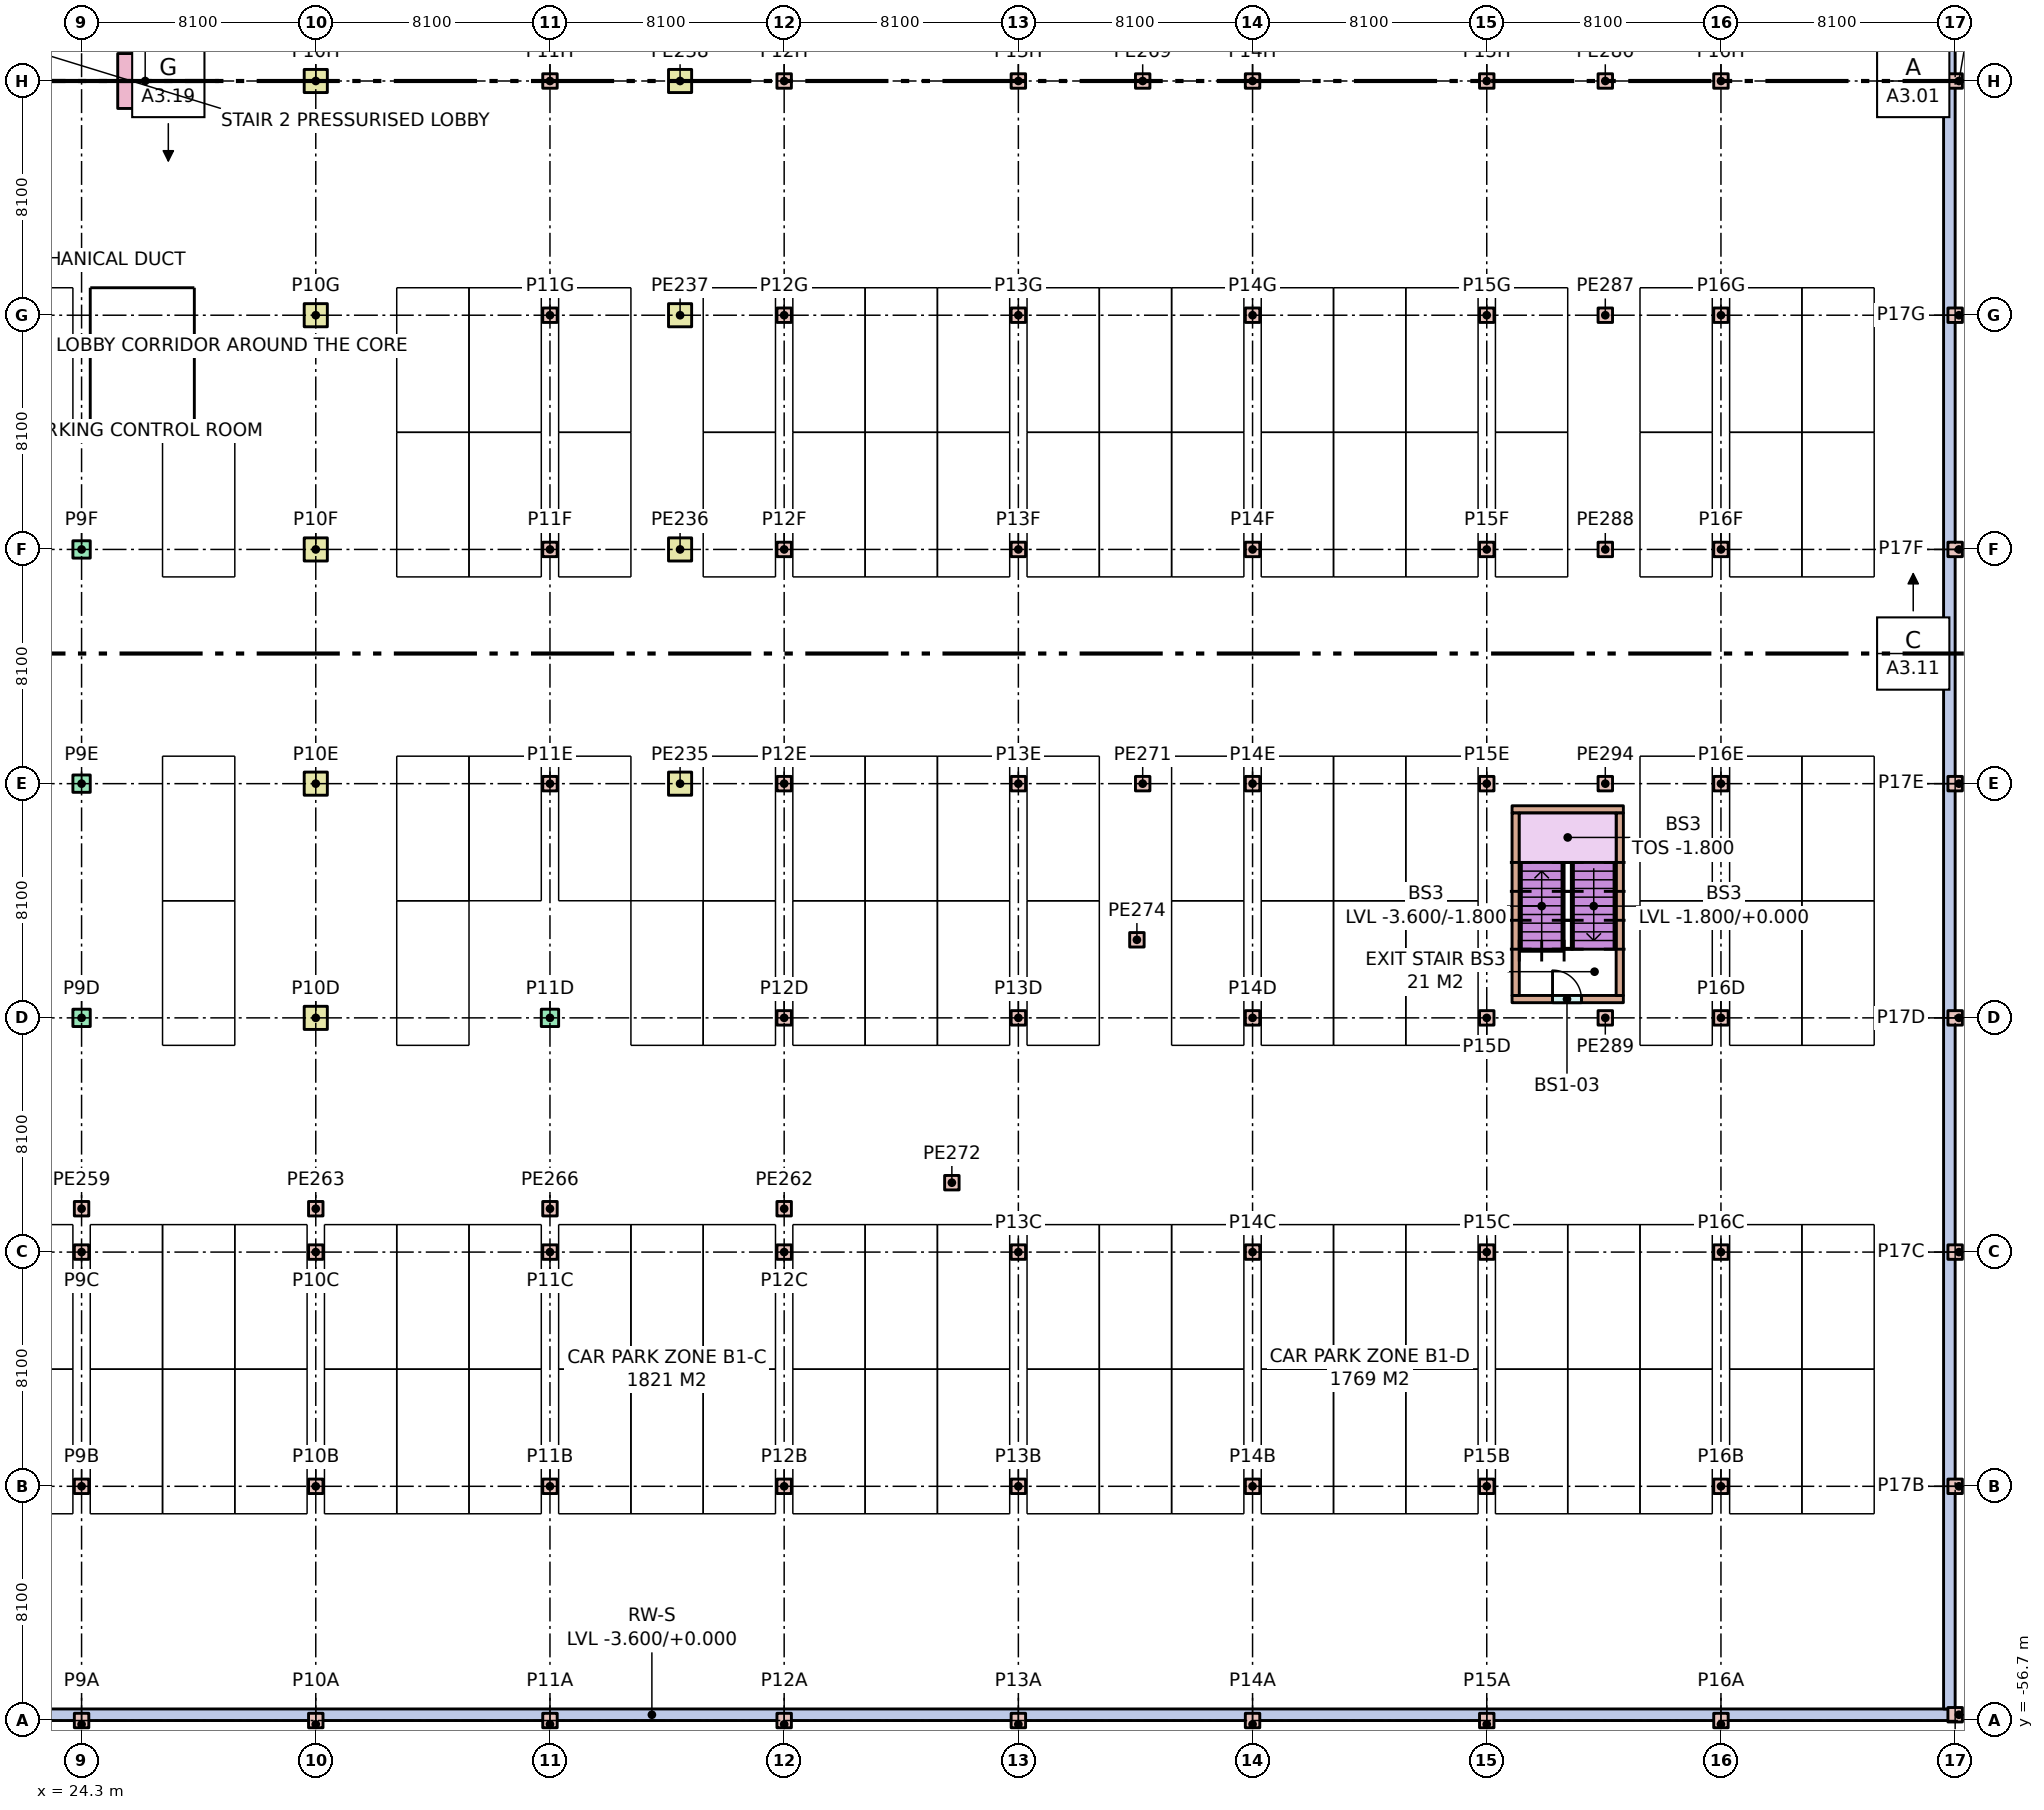
"""IFC4 building model, lengths in metres.
Left out: names, types, materials, properties, quantities, classifications, styles, units other than length and angle.
Written with IfcOpenShell. Run it as: python <this file> out.ifc"""

import sys

from ifc_helpers import new_model, si_unit, direction, frame, frame_2d, origin, origin_2d, place, context, subcontext, project, spatial, rectangle, extrude, element, fill, save


model = new_model("IFC4")
c1 = context("Model", 3, precision=1e-05, world=origin(), true_north=direction((0.0, 1.0)))
c2 = subcontext(c1, "Body", "Model", "MODEL_VIEW")
j1 = project(units=[si_unit("LENGTHUNIT", "METRE"), si_unit("PLANEANGLEUNIT", "RADIAN")], contexts=[c1])
p1 = place(None, origin())
s1 = spatial("IfcSite", under=j1, at=p1, CompositionType="ELEMENT")
p2 = place(p1, origin())
s2 = spatial("IfcBuilding", under=s1, at=p2, CompositionType="ELEMENT")
p3 = place(p2, frame((0.0, 0.0, -3.6)))
s3 = spatial("IfcBuildingStorey", under=s2, at=p3, CompositionType="ELEMENT", Elevation=-3.6)
p4 = place(p3, frame((-1.05, -56.5, 0.0), z_axis=(0.0, 0.0, 1.0), x_axis=(1.0, 0.0, 0.0)))
e1 = element("IfcWall", 1, at=p4, inside=s3, PredefinedType="SOLIDWALL", context=c2, shape_type="SweptSolid", body=[
    extrude(rectangle(XDim=90.15, YDim=0.4, at=frame_2d((45.075, 0.0))), origin(), (0.0, 0.0, 1.0), 3.6),
])
p5 = place(p3, frame((88.9, -56.3, 0.0), z_axis=(0.0, 0.0, 1.0), x_axis=(0.0, 1.0, 0.0)))
e2 = element("IfcWall", 2, at=p5, inside=s3, PredefinedType="SOLIDWALL", context=c2, shape_type="SweptSolid", body=[
    extrude(rectangle(XDim=112.6, YDim=0.4, at=frame_2d((56.3, 0.0))), origin(), (0.0, 0.0, 1.0), 3.6),
])
for number, where, z_axis, x_axis in (
    (3, (24.3, -56.7, 0.0), (0.0, 0.0, 1.0), (1.0, 0.0, 0.0)),
    (4, (24.3, -48.6, 0.0), (0.0, 0.0, 1.0), (1.0, 0.0, 0.0)),
    (5, (24.3, -40.5, 0.0), (0.0, 0.0, 1.0), (1.0, 0.0, 0.0)),
):
    element("IfcColumn", number, at=place(p3, frame(where, z_axis=z_axis, x_axis=x_axis)), inside=s3, PredefinedType="COLUMN", context=c2, shape_type="SweptSolid", body=[
        extrude(rectangle(XDim=0.5, YDim=0.5, at=origin_2d()), origin(), (0.0, 0.0, 1.0), 3.6),
    ])
for number, where, z_axis, x_axis in (
    (6, (24.3, -32.4, 0.0), (0.0, 0.0, 1.0), (1.0, 0.0, 0.0)),
    (7, (24.3, -24.3, 0.0), (0.0, 0.0, 1.0), (1.0, 0.0, 0.0)),
    (8, (24.3, -16.2, 0.0), (0.0, 0.0, 1.0), (1.0, 0.0, 0.0)),
):
    element("IfcColumn", number, at=place(p3, frame(where, z_axis=z_axis, x_axis=x_axis)), inside=s3, PredefinedType="COLUMN", context=c2, shape_type="SweptSolid", body=[
        extrude(rectangle(XDim=0.6, YDim=0.6, at=origin_2d()), origin(), (0.0, 0.0, 1.0), 3.6),
    ])
for number, where, z_axis, x_axis in (
    (9, (32.4, -56.7, 0.0), (0.0, 0.0, 1.0), (1.0, 0.0, 0.0)),
    (10, (32.4, -48.6, 0.0), (0.0, 0.0, 1.0), (1.0, 0.0, 0.0)),
    (11, (32.4, -40.5, 0.0), (0.0, 0.0, 1.0), (1.0, 0.0, 0.0)),
):
    element("IfcColumn", number, at=place(p3, frame(where, z_axis=z_axis, x_axis=x_axis)), inside=s3, PredefinedType="COLUMN", context=c2, shape_type="SweptSolid", body=[
        extrude(rectangle(XDim=0.5, YDim=0.5, at=origin_2d()), origin(), (0.0, 0.0, 1.0), 3.6),
    ])
for number, where, z_axis, x_axis in (
    (12, (32.4, -32.4, 0.0), (0.0, 0.0, 1.0), (1.0, 0.0, 0.0)),
    (13, (32.4, -24.3, 0.0), (0.0, 0.0, 1.0), (1.0, 0.0, 0.0)),
    (14, (32.4, -16.2, 0.0), (0.0, 0.0, 1.0), (1.0, 0.0, 0.0)),
    (15, (32.4, -8.1, 0.0), (0.0, 0.0, 1.0), (1.0, 0.0, 0.0)),
    (16, (32.4, 0.0, 0.0), (0.0, 0.0, 1.0), (1.0, 0.0, 0.0)),
):
    element("IfcColumn", number, at=place(p3, frame(where, z_axis=z_axis, x_axis=x_axis)), inside=s3, PredefinedType="COLUMN", context=c2, shape_type="SweptSolid", body=[
        extrude(rectangle(XDim=0.8, YDim=0.8, at=origin_2d()), origin(), (0.0, 0.0, 1.0), 3.6),
    ])
for number, where, z_axis, x_axis in (
    (17, (40.5, -56.7, 0.0), (0.0, 0.0, 1.0), (1.0, 0.0, 0.0)),
    (18, (40.5, -48.6, 0.0), (0.0, 0.0, 1.0), (1.0, 0.0, 0.0)),
    (19, (40.5, -40.5, 0.0), (0.0, 0.0, 1.0), (1.0, 0.0, 0.0)),
):
    element("IfcColumn", number, at=place(p3, frame(where, z_axis=z_axis, x_axis=x_axis)), inside=s3, PredefinedType="COLUMN", context=c2, shape_type="SweptSolid", body=[
        extrude(rectangle(XDim=0.5, YDim=0.5, at=origin_2d()), origin(), (0.0, 0.0, 1.0), 3.6),
    ])
p6 = place(p3, frame((40.5, -32.4, 0.0), z_axis=(0.0, 0.0, 1.0), x_axis=(1.0, 0.0, 0.0)))
e20 = element("IfcColumn", 20, at=p6, inside=s3, PredefinedType="COLUMN", context=c2, shape_type="SweptSolid", body=[
    extrude(rectangle(XDim=0.6, YDim=0.6, at=origin_2d()), origin(), (0.0, 0.0, 1.0), 3.6),
])
for number, where, z_axis, x_axis in (
    (21, (40.5, -24.3, 0.0), (0.0, 0.0, 1.0), (1.0, 0.0, 0.0)),
    (22, (40.5, -16.2, 0.0), (0.0, 0.0, 1.0), (1.0, 0.0, 0.0)),
    (23, (40.5, -8.1, 0.0), (0.0, 0.0, 1.0), (1.0, 0.0, 0.0)),
    (24, (40.5, 0.0, 0.0), (0.0, 0.0, 1.0), (1.0, 0.0, 0.0)),
    (25, (48.6, -56.7, 0.0), (0.0, 0.0, 1.0), (1.0, 0.0, 0.0)),
    (26, (48.6, -48.6, 0.0), (0.0, 0.0, 1.0), (1.0, 0.0, 0.0)),
    (27, (48.6, -40.5, 0.0), (0.0, 0.0, 1.0), (1.0, 0.0, 0.0)),
    (28, (48.6, -32.4, 0.0), (0.0, 0.0, 1.0), (1.0, 0.0, 0.0)),
    (29, (48.6, -24.3, 0.0), (0.0, 0.0, 1.0), (1.0, 0.0, 0.0)),
    (30, (48.6, -16.2, 0.0), (0.0, 0.0, 1.0), (1.0, 0.0, 0.0)),
    (31, (48.6, -8.1, 0.0), (0.0, 0.0, 1.0), (1.0, 0.0, 0.0)),
    (32, (48.6, 0.0, 0.0), (0.0, 0.0, 1.0), (1.0, 0.0, 0.0)),
    (33, (56.7, -56.7, 0.0), (0.0, 0.0, 1.0), (1.0, 0.0, 0.0)),
    (34, (56.7, -48.6, 0.0), (0.0, 0.0, 1.0), (1.0, 0.0, 0.0)),
    (35, (56.7, -40.5, 0.0), (0.0, 0.0, 1.0), (1.0, 0.0, 0.0)),
    (36, (56.7, -32.4, 0.0), (0.0, 0.0, 1.0), (1.0, 0.0, 0.0)),
    (37, (56.7, -24.3, 0.0), (0.0, 0.0, 1.0), (1.0, 0.0, 0.0)),
    (38, (56.7, -16.2, 0.0), (0.0, 0.0, 1.0), (1.0, 0.0, 0.0)),
    (39, (56.7, -8.1, 0.0), (0.0, 0.0, 1.0), (1.0, 0.0, 0.0)),
    (40, (56.7, 0.0, 0.0), (0.0, 0.0, 1.0), (1.0, 0.0, 0.0)),
    (41, (64.8, -56.7, 0.0), (0.0, 0.0, 1.0), (1.0, 0.0, 0.0)),
    (42, (64.8, -48.6, 0.0), (0.0, 0.0, 1.0), (1.0, 0.0, 0.0)),
    (43, (64.8, -40.5, 0.0), (0.0, 0.0, 1.0), (1.0, 0.0, 0.0)),
    (44, (64.8, -32.4, 0.0), (0.0, 0.0, 1.0), (1.0, 0.0, 0.0)),
    (45, (64.8, -24.3, 0.0), (0.0, 0.0, 1.0), (1.0, 0.0, 0.0)),
    (46, (64.8, -16.2, 0.0), (0.0, 0.0, 1.0), (1.0, 0.0, 0.0)),
    (47, (64.8, -8.1, 0.0), (0.0, 0.0, 1.0), (1.0, 0.0, 0.0)),
    (48, (64.8, 0.0, 0.0), (0.0, 0.0, 1.0), (1.0, 0.0, 0.0)),
    (49, (72.9, -56.7, 0.0), (0.0, 0.0, 1.0), (1.0, 0.0, 0.0)),
    (50, (72.9, -48.6, 0.0), (0.0, 0.0, 1.0), (1.0, 0.0, 0.0)),
    (51, (72.9, -40.5, 0.0), (0.0, 0.0, 1.0), (1.0, 0.0, 0.0)),
    (52, (72.9, -32.4, 0.0), (0.0, 0.0, 1.0), (1.0, 0.0, 0.0)),
    (53, (72.9, -24.3, 0.0), (0.0, 0.0, 1.0), (1.0, 0.0, 0.0)),
    (54, (72.9, -16.2, 0.0), (0.0, 0.0, 1.0), (1.0, 0.0, 0.0)),
    (55, (72.9, -8.1, 0.0), (0.0, 0.0, 1.0), (1.0, 0.0, 0.0)),
    (56, (72.9, 0.0, 0.0), (0.0, 0.0, 1.0), (1.0, 0.0, 0.0)),
    (57, (81.0, -56.7, 0.0), (0.0, 0.0, 1.0), (1.0, 0.0, 0.0)),
    (58, (81.0, -48.6, 0.0), (0.0, 0.0, 1.0), (1.0, 0.0, 0.0)),
    (59, (81.0, -40.5, 0.0), (0.0, 0.0, 1.0), (1.0, 0.0, 0.0)),
    (60, (81.0, -32.4, 0.0), (0.0, 0.0, 1.0), (1.0, 0.0, 0.0)),
    (61, (81.0, -24.3, 0.0), (0.0, 0.0, 1.0), (1.0, 0.0, 0.0)),
    (62, (81.0, -16.2, 0.0), (0.0, 0.0, 1.0), (1.0, 0.0, 0.0)),
    (63, (81.0, -8.1, 0.0), (0.0, 0.0, 1.0), (1.0, 0.0, 0.0)),
    (64, (81.0, 0.0, 0.0), (0.0, 0.0, 1.0), (1.0, 0.0, 0.0)),
    (65, (89.1, -56.5, 0.0), (0.0, 0.0, 1.0), (1.0, 0.0, 0.0)),
    (66, (89.1, -48.6, 0.0), (0.0, 0.0, 1.0), (1.0, 0.0, 0.0)),
    (67, (89.1, -40.5, 0.0), (0.0, 0.0, 1.0), (1.0, 0.0, 0.0)),
    (68, (89.1, -32.4, 0.0), (0.0, 0.0, 1.0), (1.0, 0.0, 0.0)),
    (69, (89.1, -24.3, 0.0), (0.0, 0.0, 1.0), (1.0, 0.0, 0.0)),
    (70, (89.1, -16.2, 0.0), (0.0, 0.0, 1.0), (1.0, 0.0, 0.0)),
    (71, (89.1, -8.1, 0.0), (0.0, 0.0, 1.0), (1.0, 0.0, 0.0)),
    (72, (89.1, 0.0, 0.0), (0.0, 0.0, 1.0), (1.0, 0.0, 0.0)),
):
    element("IfcColumn", number, at=place(p3, frame(where, z_axis=z_axis, x_axis=x_axis)), inside=s3, PredefinedType="COLUMN", context=c2, shape_type="SweptSolid", body=[
        extrude(rectangle(XDim=0.5, YDim=0.5, at=origin_2d()), origin(), (0.0, 0.0, 1.0), 3.6),
    ])
for number, where, z_axis, x_axis in (
    (73, (45.0, -24.3, 0.0), (0.0, 0.0, 1.0), (1.0, 0.0, 0.0)),
    (74, (45.0, -16.2, 0.0), (0.0, 0.0, 1.0), (1.0, 0.0, 0.0)),
    (75, (45.0, -8.1, 0.0), (0.0, 0.0, 1.0), (1.0, 0.0, 0.0)),
    (76, (45.0, 0.0, 0.0), (0.0, 0.0, 1.0), (1.0, 0.0, 0.0)),
):
    element("IfcColumn", number, at=place(p3, frame(where, z_axis=z_axis, x_axis=x_axis)), inside=s3, PredefinedType="COLUMN", context=c2, shape_type="SweptSolid", body=[
        extrude(rectangle(XDim=0.8, YDim=0.8, at=origin_2d()), origin(), (0.0, 0.0, 1.0), 3.6),
    ])
for number, where, z_axis, x_axis in (
    (77, (24.3, -39.0, 0.0), (0.0, 0.0, 1.0), (1.0, 0.0, 0.0)),
    (78, (48.6, -39.0, 0.0), (0.0, 0.0, 1.0), (1.0, 0.0, 0.0)),
    (79, (32.4, -39.0, 0.0), (0.0, 0.0, 1.0), (1.0, 0.0, 0.0)),
    (80, (40.5, -39.0, 0.0), (0.0, 0.0, 1.0), (1.0, 0.0, 0.0)),
    (81, (61.0, 0.0, 0.0), (0.0, 0.0, 1.0), (1.0, 0.0, 0.0)),
    (82, (61.0, -24.3, 0.0), (0.0, 0.0, 1.0), (1.0, 0.0, 0.0)),
    (83, (54.4, -38.1, 0.0), (0.0, 0.0, 1.0), (1.0, 0.0, 0.0)),
    (84, (60.8, -29.7, 0.0), (0.0, 0.0, 1.0), (1.0, 0.0, 0.0)),
    (85, (77.0, 0.0, 0.0), (0.0, 0.0, 1.0), (1.0, 0.0, 0.0)),
    (86, (77.0, -8.1, 0.0), (0.0, 0.0, 1.0), (1.0, 0.0, 0.0)),
    (87, (77.0, -16.2, 0.0), (0.0, 0.0, 1.0), (1.0, 0.0, 0.0)),
    (88, (77.0, -32.4, 0.0), (0.0, 0.0, 1.0), (1.0, 0.0, 0.0)),
    (89, (77.0, -24.3, 0.0), (0.0, 0.0, 1.0), (1.0, 0.0, 0.0)),
):
    element("IfcColumn", number, at=place(p3, frame(where, z_axis=z_axis, x_axis=x_axis)), inside=s3, PredefinedType="COLUMN", context=c2, shape_type="SweptSolid", body=[
        extrude(rectangle(XDim=0.5, YDim=0.5, at=origin_2d()), origin(), (0.0, 0.0, 1.0), 3.6),
    ])
p7 = place(p3, frame((26.5, 0.0, 0.0), z_axis=(0.0, 0.0, 1.0), x_axis=(0.0, 1.0, 0.0)))
e90 = element("IfcColumn", 90, at=p7, inside=s3, PredefinedType="COLUMN", context=c2, shape_type="SweptSolid", body=[
    extrude(rectangle(XDim=1.9, YDim=1.9, at=origin_2d()), origin(), (0.0, 0.0, 1.0), 3.6),
])
p8 = place(p3, frame((73.775, -31.75, 0.0), z_axis=(0.0, 0.0, 1.0), x_axis=(1.0, 0.0, 0.0)))
e91 = element("IfcWall", 91, at=p8, inside=s3, PredefinedType="STANDARD", context=c2, shape_type="SweptSolid", body=[
    extrude(rectangle(XDim=3.85, YDim=0.25, at=frame_2d((1.925, 0.0))), origin(), (0.0, 0.0, 1.0), 3.15),
])
p9 = place(p8, frame((1.4, 0.0, 0.0)))
e92 = element("IfcOpeningElement", 92, at=p9, cuts=e91, PredefinedType="OPENING", context=c2, shape_type="SweptSolid", body=[
    extrude(rectangle(XDim=1.0, YDim=2.1, at=frame_2d((0.5, 1.05))), frame((0.0, 0.135, 0.0), z_axis=(0.0, -1.0, 0.0), x_axis=(1.0, 0.0, 0.0)), (0.0, 0.0, 1.0), 0.27),
])
p10 = place(p3, frame((73.775, -25.19, 0.0), z_axis=(0.0, 0.0, 1.0), x_axis=(1.0, 0.0, 0.0)))
e93 = element("IfcWall", 93, at=p10, inside=s3, PredefinedType="STANDARD", context=c2, shape_type="SweptSolid", body=[
    extrude(rectangle(XDim=3.85, YDim=0.25, at=frame_2d((1.925, 0.0))), origin(), (0.0, 0.0, 1.0), 3.15),
])
for number, where, z_axis, x_axis in (
    (94, (73.9, -31.625, 0.0), (0.0, 0.0, 1.0), (0.0, 1.0, 0.0)),
    (95, (77.5, -31.625, 0.0), (0.0, 0.0, 1.0), (0.0, 1.0, 0.0)),
):
    element("IfcWall", number, at=place(p3, frame(where, z_axis=z_axis, x_axis=x_axis)), inside=s3, PredefinedType="STANDARD", context=c2, shape_type="SweptSolid", body=[
        extrude(rectangle(XDim=6.31, YDim=0.25, at=frame_2d((3.155, 0.0))), origin(), (0.0, 0.0, 1.0), 3.15),
    ])
p11 = place(p9, origin())
e96 = element("IfcDoor", 96, at=p11, inside=s3, OperationType="SINGLE_SWING_LEFT", PredefinedType="DOOR", context=c2, shape_type="SweptSolid", body=[
    extrude(rectangle(XDim=1.0, YDim=2.1, at=frame_2d((0.5, 1.05))), frame((0.0, 0.025, 0.0), z_axis=(0.0, -1.0, 0.0), x_axis=(1.0, 0.0, 0.0)), (0.0, 0.0, 1.0), 0.05),
])
fill(e92, e96)
save(model, sys.argv[1])
